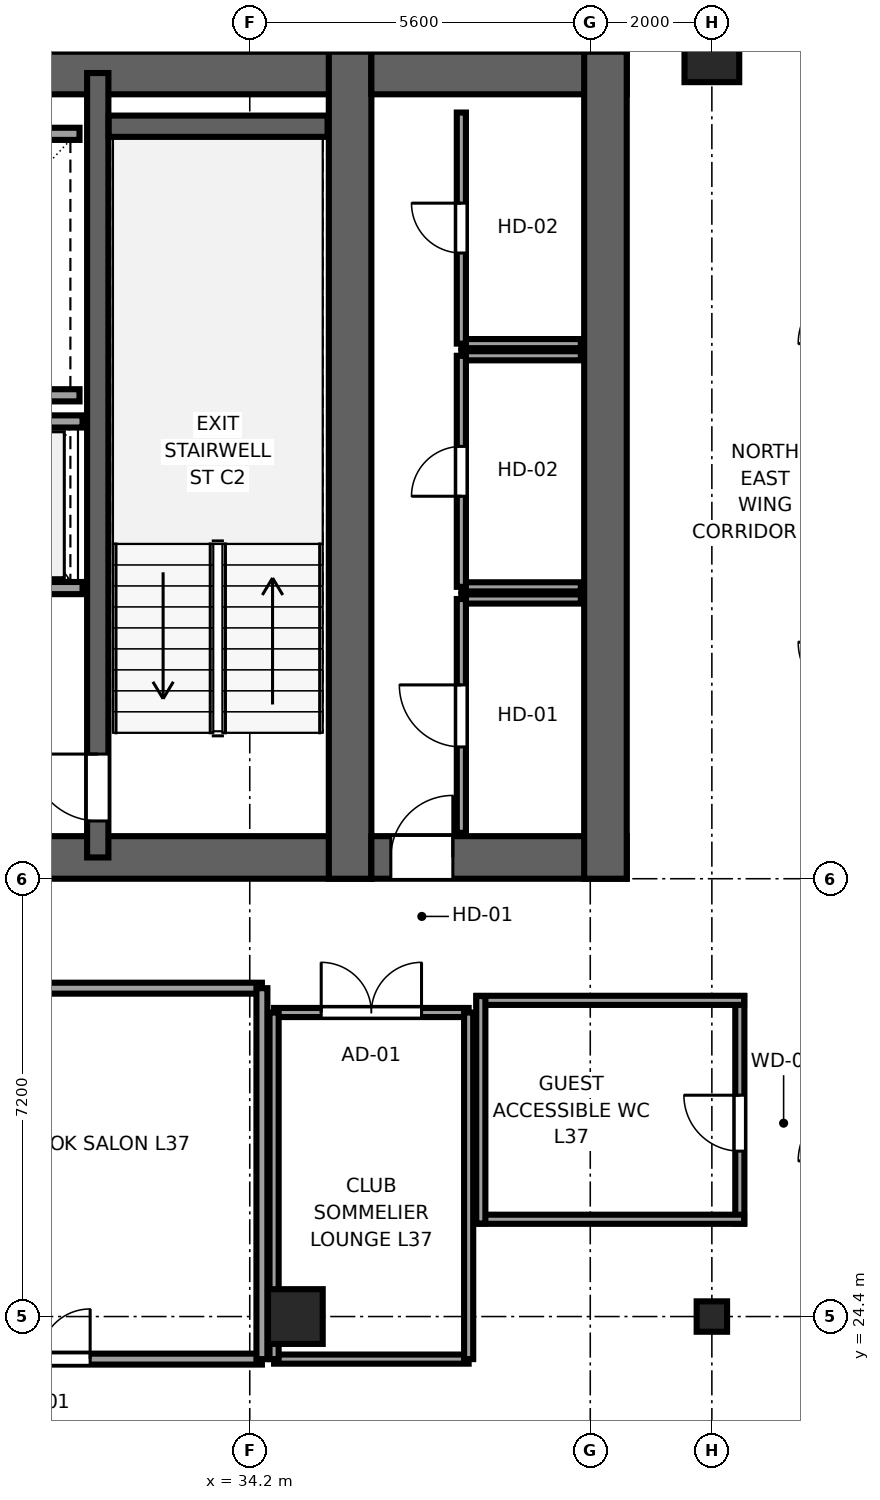
"""IFC4 building model, lengths in metres.
Left out: names, types, materials, properties, quantities, classifications, styles, units other than length and angle.
Written with IfcOpenShell. Run it as: python <this file> out.ifc"""

import sys

from ifc_helpers import new_model, si_unit, direction, frame, frame_2d, origin, origin_2d, place, context, subcontext, project, spatial, rectangle, i_section, extrude, source, transform, mapped, element, fill, save


model = new_model("IFC4")
c1 = context("Model", 3, precision=1e-05, world=origin(), true_north=direction((0.0, 1.0)))
c2 = subcontext(c1, "Body", "Model", "MODEL_VIEW")
j1 = project(units=[si_unit("LENGTHUNIT", "METRE"), si_unit("PLANEANGLEUNIT", "RADIAN")], contexts=[c1])
p1 = place(None, origin())
s1 = spatial("IfcSite", under=j1, at=p1, CompositionType="ELEMENT")
p2 = place(p1, origin())
s2 = spatial("IfcBuilding", under=s1, at=p2, CompositionType="ELEMENT")
p3 = place(p2, frame((0.0, 0.0, 143.5)))
s3 = spatial("IfcBuildingStorey", under=s2, at=p3, CompositionType="ELEMENT", Elevation=143.5)
p4 = place(p3, frame((9.8, 31.95, 0.0), z_axis=(0.0, 0.0, 1.0), x_axis=(1.0, 0.0, 0.0)))
e1 = element("IfcWall", 1, at=p4, inside=s3, PredefinedType="SHEAR", context=c2, shape_type="SweptSolid", body=[
    extrude(rectangle(XDim=26.4, YDim=0.7, at=frame_2d((13.2, 0.0))), origin(), (0.0, 0.0, 1.0), 3.55),
])
p5 = place(p4, frame((6.32, 0.0, 0.0), z_axis=(0.0, 0.0, 1.0), x_axis=(-1.0, 0.0, 0.0)))
e2 = element("IfcOpeningElement", 2, at=p5, cuts=e1, PredefinedType="OPENING", context=c2, shape_type="SweptSolid", body=[
    extrude(rectangle(XDim=1.5, YDim=2.04, at=frame_2d((0.75, 1.02))), frame((0.0, 0.36, 0.0), z_axis=(0.0, -1.0, 0.0), x_axis=(1.0, 0.0, 0.0)), (0.0, 0.0, 1.0), 0.72),
])
p6 = place(p4, frame((13.95, 0.0, 0.0), z_axis=(0.0, 0.0, 1.0), x_axis=(-1.0, 0.0, 0.0)))
e3 = element("IfcOpeningElement", 3, at=p6, cuts=e1, PredefinedType="OPENING", context=c2, shape_type="SweptSolid", body=[
    extrude(rectangle(XDim=1.5, YDim=2.04, at=frame_2d((0.75, 1.02))), frame((0.0, 0.36, 0.0), z_axis=(0.0, -1.0, 0.0), x_axis=(1.0, 0.0, 0.0)), (0.0, 0.0, 1.0), 0.72),
])
p7 = place(p4, frame((20.25, 0.0, 0.0), z_axis=(0.0, 0.0, 1.0), x_axis=(-1.0, 0.0, 0.0)))
e4 = element("IfcOpeningElement", 4, at=p7, cuts=e1, PredefinedType="OPENING", context=c2, shape_type="SweptSolid", body=[
    extrude(rectangle(XDim=1.5, YDim=2.04, at=frame_2d((0.75, 1.02))), frame((0.0, 0.36, 0.0), z_axis=(0.0, -1.0, 0.0), x_axis=(1.0, 0.0, 0.0)), (0.0, 0.0, 1.0), 0.72),
])
p8 = place(p4, frame((8.37, 0.0, 0.0), z_axis=(0.0, 0.0, 1.0), x_axis=(-1.0, 0.0, 0.0)))
e5 = element("IfcOpeningElement", 5, at=p8, cuts=e1, PredefinedType="OPENING", context=c2, shape_type="SweptSolid", body=[
    extrude(rectangle(XDim=0.82, YDim=2.01, at=frame_2d((0.41, 1.005))), frame((0.0, 0.36, 0.0), z_axis=(0.0, -1.0, 0.0), x_axis=(1.0, 0.0, 0.0)), (0.0, 0.0, 1.0), 0.72),
])
p9 = place(p3, frame((9.8, 44.85, 0.0), z_axis=(0.0, 0.0, 1.0), x_axis=(1.0, 0.0, 0.0)))
e6 = element("IfcWall", 6, at=p9, inside=s3, PredefinedType="SHEAR", context=c2, shape_type="SweptSolid", body=[
    extrude(rectangle(XDim=26.4, YDim=0.7, at=frame_2d((13.2, 0.0))), origin(), (0.0, 0.0, 1.0), 3.55),
])
p10 = place(p3, frame((35.85, 31.6, 0.0), z_axis=(0.0, 0.0, 1.0), x_axis=(0.0, 1.0, 0.0)))
e7 = element("IfcWall", 7, at=p10, inside=s3, PredefinedType="SHEAR", context=c2, shape_type="SweptSolid", body=[
    extrude(rectangle(XDim=13.6, YDim=0.7, at=frame_2d((6.8, 0.0))), origin(), (0.0, 0.0, 1.0), 3.55),
])
p11 = place(p3, frame((31.7, 31.95, 0.0), z_axis=(0.0, 0.0, 1.0), x_axis=(0.0, 1.0, 0.0)))
e8 = element("IfcWall", 8, at=p11, inside=s3, PredefinedType="SHEAR", context=c2, shape_type="SweptSolid", body=[
    extrude(rectangle(XDim=12.9, YDim=0.35, at=frame_2d((6.45, 0.0))), origin(), (0.0, 0.0, 1.0), 3.55),
])
p12 = place(p11, frame((1.7, 0.0, 0.0), z_axis=(0.0, 0.0, 1.0), x_axis=(-1.0, 0.0, 0.0)))
e9 = element("IfcOpeningElement", 9, at=p12, cuts=e8, PredefinedType="OPENING", context=c2, shape_type="SweptSolid", body=[
    extrude(rectangle(XDim=1.1, YDim=2.12, at=frame_2d((0.55, 1.06))), frame((0.0, 0.185, 0.0), z_axis=(0.0, -1.0, 0.0), x_axis=(1.0, 0.0, 0.0)), (0.0, 0.0, 1.0), 0.37),
])
p13 = place(p3, frame((36.2, 31.95, 0.0), z_axis=(0.0, 0.0, 1.0), x_axis=(1.0, 0.0, 0.0)))
e10 = element("IfcWall", 10, at=p13, inside=s3, PredefinedType="SHEAR", context=c2, shape_type="SweptSolid", body=[
    extrude(rectangle(XDim=4.2, YDim=0.7, at=frame_2d((2.1, 0.0))), origin(), (0.0, 0.0, 1.0), 3.55),
])
p14 = place(p13, frame((1.34, 0.0, 0.0), z_axis=(0.0, 0.0, 1.0), x_axis=(-1.0, 0.0, 0.0)))
e11 = element("IfcOpeningElement", 11, at=p14, cuts=e10, PredefinedType="OPENING", context=c2, shape_type="SweptSolid", body=[
    extrude(rectangle(XDim=1.02, YDim=2.03, at=frame_2d((0.51, 1.015))), frame((0.0, 0.36, 0.0), z_axis=(0.0, -1.0, 0.0), x_axis=(1.0, 0.0, 0.0)), (0.0, 0.0, 1.0), 0.72),
])
p15 = place(p3, frame((36.2, 44.85, 0.0), z_axis=(0.0, 0.0, 1.0), x_axis=(1.0, 0.0, 0.0)))
e12 = element("IfcWall", 12, at=p15, inside=s3, PredefinedType="SHEAR", context=c2, shape_type="SweptSolid", body=[
    extrude(rectangle(XDim=4.2, YDim=0.7, at=frame_2d((2.1, 0.0))), origin(), (0.0, 0.0, 1.0), 3.55),
])
p16 = place(p3, frame((40.05, 31.6, 0.0), z_axis=(0.0, 0.0, 1.0), x_axis=(0.0, 1.0, 0.0)))
e13 = element("IfcWall", 13, at=p16, inside=s3, PredefinedType="SHEAR", context=c2, shape_type="SweptSolid", body=[
    extrude(rectangle(XDim=13.6, YDim=0.7, at=frame_2d((6.8, 0.0))), origin(), (0.0, 0.0, 1.0), 3.55),
])
p17 = place(p3, frame((31.88, 43.975, 0.0), z_axis=(0.0, 0.0, 1.0), x_axis=(1.0, 0.0, 0.0)))
e14 = element("IfcWall", 14, at=p17, inside=s3, PredefinedType="SHEAR", context=c2, shape_type="SweptSolid", body=[
    extrude(rectangle(XDim=3.6, YDim=0.35, at=frame_2d((1.8, 0.0))), origin(), (0.0, 0.0, 1.0), 3.55),
])
m1 = source(origin(), c2, "Body", "SweptSolid", [
    extrude(rectangle(XDim=0.9, YDim=0.9, at=origin_2d()), origin(), (0.0, 0.0, 1.0), 3.55),
])
p18 = place(p3, frame((34.95, 24.4, 0.0), z_axis=(0.0, 0.0, 1.0), x_axis=(1.0, 0.0, 0.0)))
e15 = element("IfcColumn", 15, at=p18, inside=s3, PredefinedType="COLUMN", context=c2, shape_type="MappedRepresentation", body=[
    mapped(m1, transform((0.0, 0.0, 0.0), x_axis=(1.0, 0.0, 0.0), y_axis=(0.0, 1.0, 0.0), z_axis=(0.0, 0.0, 1.0), scale=1.0)),
])
m2 = source(origin(), c2, "Body", "SweptSolid", [
    extrude(i_section(OverallWidth=0.5, OverallDepth=0.5, WebThickness=0.022, FlangeThickness=0.034, at=origin_2d()), origin(), (0.0, 0.0, 1.0), 3.55),
])
p19 = place(p3, frame((41.8, 24.4, 0.0), z_axis=(0.0, 0.0, 1.0), x_axis=(1.0, 0.0, 0.0)))
e16 = element("IfcColumn", 16, at=p19, inside=s3, PredefinedType="COLUMN", context=c2, shape_type="MappedRepresentation", body=[
    mapped(m2, transform((0.0, 0.0, 0.0), x_axis=(1.0, 0.0, 0.0), y_axis=(0.0, 1.0, 0.0), z_axis=(0.0, 0.0, 1.0), scale=1.0)),
])
p20 = place(p3, frame((41.8, 45.15, 0.0), z_axis=(0.0, 0.0, 1.0), x_axis=(1.0, 0.0, 0.0)))
e17 = element("IfcColumn", 17, at=p20, inside=s3, PredefinedType="COLUMN", context=c2, shape_type="MappedRepresentation", body=[
    mapped(m1, transform((0.0, 0.0, 0.0), x_axis=(1.0, 0.0, 0.0), y_axis=(0.0, 1.0, 0.0), z_axis=(0.0, 0.0, 1.0), scale=1.0)),
])
for number, where, z_axis, x_axis in (
    (18, (27.3, 39.55, 0.0), (0.0, 0.0, 1.0), (1.0, 0.0, 0.0)),
    (19, (27.3, 43.85, 0.0), (0.0, 0.0, 1.0), (1.0, 0.0, 0.0)),
):
    element("IfcWall", number, at=place(p3, frame(where, z_axis=z_axis, x_axis=x_axis)), inside=s3, PredefinedType="SOLIDWALL", context=c2, shape_type="SweptSolid", body=[
        extrude(rectangle(XDim=4.1, YDim=0.2, at=frame_2d((2.05, 0.0))), origin(), (0.0, 0.0, 1.0), 3.29),
    ])
p21 = place(p3, frame((27.375, 36.38, 0.0), z_axis=(0.0, 0.0, 1.0), x_axis=(1.0, 0.0, 0.0)))
e20 = element("IfcWall", 20, at=p21, inside=s3, PredefinedType="SOLIDWALL", context=c2, shape_type="SweptSolid", body=[
    extrude(rectangle(XDim=4.075, YDim=0.2, at=frame_2d((2.038, 0.0))), origin(), (0.0, 0.0, 1.0), 3.29),
])
p22 = place(p21, frame((0.525, 0.0, 0.0)))
e21 = element("IfcOpeningElement", 21, at=p22, cuts=e20, PredefinedType="OPENING", context=c2, shape_type="SweptSolid", body=[
    extrude(rectangle(XDim=1.1, YDim=2.12, at=frame_2d((0.55, 1.06))), frame((0.0, 0.11, 0.0), z_axis=(0.0, -1.0, 0.0), x_axis=(1.0, 0.0, 0.0)), (0.0, 0.0, 1.0), 0.22),
])
p23 = place(p21, frame((2.425, 0.0, 0.0)))
e22 = element("IfcOpeningElement", 22, at=p23, cuts=e20, PredefinedType="OPENING", context=c2, shape_type="SweptSolid", body=[
    extrude(rectangle(XDim=1.1, YDim=2.12, at=frame_2d((0.55, 1.06))), frame((0.0, 0.11, 0.0), z_axis=(0.0, -1.0, 0.0), x_axis=(1.0, 0.0, 0.0)), (0.0, 0.0, 1.0), 0.22),
])
p24 = place(p3, frame((27.375, 39.12, 0.0), z_axis=(0.0, 0.0, 1.0), x_axis=(1.0, 0.0, 0.0)))
e23 = element("IfcWall", 23, at=p24, inside=s3, PredefinedType="SOLIDWALL", context=c2, shape_type="SweptSolid", body=[
    extrude(rectangle(XDim=4.075, YDim=0.2, at=frame_2d((2.038, 0.0))), origin(), (0.0, 0.0, 1.0), 3.29),
])
p25 = place(p3, frame((37.68, 36.2, 0.0), z_axis=(0.0, 0.0, 1.0), x_axis=(1.0, 0.0, 0.0)))
e24 = element("IfcWall", 24, at=p25, inside=s3, PredefinedType="PARTITIONING", context=c2, shape_type="SweptSolid", body=[
    extrude(rectangle(XDim=1.965, YDim=0.15, at=frame_2d((0.982, 0.0))), origin(), (0.0, 0.0, 1.0), 3.29),
])
p26 = place(p3, frame((37.68, 32.355, 0.0), z_axis=(0.0, 0.0, 1.0), x_axis=(0.0, 1.0, 0.0)))
e25 = element("IfcWall", 25, at=p26, inside=s3, PredefinedType="PARTITIONING", context=c2, shape_type="SweptSolid", body=[
    extrude(rectangle(XDim=3.845, YDim=0.15, at=frame_2d((1.922, 0.0))), origin(), (0.0, 0.0, 1.0), 3.29),
])
p27 = place(p26, frame((1.413, 0.0, 0.0)))
e26 = element("IfcOpeningElement", 26, at=p27, cuts=e25, PredefinedType="OPENING", context=c2, shape_type="SweptSolid", body=[
    extrude(rectangle(XDim=1.02, YDim=2.03, at=frame_2d((0.51, 1.015))), frame((0.0, 0.085, 0.0), z_axis=(0.0, -1.0, 0.0), x_axis=(1.0, 0.0, 0.0)), (0.0, 0.0, 1.0), 0.17),
])
for number, where, z_axis, x_axis in (
    (27, (37.68, 36.4, 0.0), (0.0, 0.0, 1.0), (1.0, 0.0, 0.0)),
    (28, (37.68, 40.2, 0.0), (0.0, 0.0, 1.0), (1.0, 0.0, 0.0)),
):
    element("IfcWall", number, at=place(p3, frame(where, z_axis=z_axis, x_axis=x_axis)), inside=s3, PredefinedType="PARTITIONING", context=c2, shape_type="SweptSolid", body=[
        extrude(rectangle(XDim=1.965, YDim=0.15, at=frame_2d((0.982, 0.0))), origin(), (0.0, 0.0, 1.0), 3.29),
    ])
p28 = place(p3, frame((37.68, 36.4, 0.0), z_axis=(0.0, 0.0, 1.0), x_axis=(0.0, 1.0, 0.0)))
e29 = element("IfcWall", 29, at=p28, inside=s3, PredefinedType="PARTITIONING", context=c2, shape_type="SweptSolid", body=[
    extrude(rectangle(XDim=3.8, YDim=0.15, at=frame_2d((1.9, 0.0))), origin(), (0.0, 0.0, 1.0), 3.29),
])
p29 = place(p28, frame((1.49, 0.0, 0.0)))
e30 = element("IfcOpeningElement", 30, at=p29, cuts=e29, PredefinedType="OPENING", context=c2, shape_type="SweptSolid", body=[
    extrude(rectangle(XDim=0.82, YDim=2.01, at=frame_2d((0.41, 1.005))), frame((0.0, 0.085, 0.0), z_axis=(0.0, -1.0, 0.0), x_axis=(1.0, 0.0, 0.0)), (0.0, 0.0, 1.0), 0.17),
])
p30 = place(p3, frame((37.68, 40.4, 0.0), z_axis=(0.0, 0.0, 1.0), x_axis=(1.0, 0.0, 0.0)))
e31 = element("IfcWall", 31, at=p30, inside=s3, PredefinedType="PARTITIONING", context=c2, shape_type="SweptSolid", body=[
    extrude(rectangle(XDim=1.965, YDim=0.15, at=frame_2d((0.982, 0.0))), origin(), (0.0, 0.0, 1.0), 3.29),
])
p31 = place(p3, frame((37.68, 40.4, 0.0), z_axis=(0.0, 0.0, 1.0), x_axis=(0.0, 1.0, 0.0)))
e32 = element("IfcWall", 32, at=p31, inside=s3, PredefinedType="PARTITIONING", context=c2, shape_type="SweptSolid", body=[
    extrude(rectangle(XDim=3.8, YDim=0.15, at=frame_2d((1.9, 0.0))), origin(), (0.0, 0.0, 1.0), 3.29),
])
p32 = place(p31, frame((1.49, 0.0, 0.0)))
e33 = element("IfcOpeningElement", 33, at=p32, cuts=e32, PredefinedType="OPENING", context=c2, shape_type="SweptSolid", body=[
    extrude(rectangle(XDim=0.82, YDim=2.01, at=frame_2d((0.41, 1.005))), frame((0.0, 0.085, 0.0), z_axis=(0.0, -1.0, 0.0), x_axis=(1.0, 0.0, 0.0)), (0.0, 0.0, 1.0), 0.17),
])
p33 = place(p3, frame((42.26, 25.93, 0.0), z_axis=(0.0, 0.0, 1.0), x_axis=(0.0, 1.0, 0.0)))
e34 = element("IfcWall", 34, at=p33, inside=s3, PredefinedType="PARTITIONING", context=c2, shape_type="SweptSolid", body=[
    extrude(rectangle(XDim=3.74, YDim=0.15, at=frame_2d((1.87, 0.0))), origin(), (0.0, 0.0, 1.0), 3.29),
])
p34 = place(p33, frame((1.19, 0.0, 0.0)))
e35 = element("IfcOpeningElement", 35, at=p34, cuts=e34, PredefinedType="OPENING", context=c2, shape_type="SweptSolid", body=[
    extrude(rectangle(XDim=0.92, YDim=2.01, at=frame_2d((0.46, 1.005))), frame((0.0, 0.085, 0.0), z_axis=(0.0, -1.0, 0.0), x_axis=(1.0, 0.0, 0.0)), (0.0, 0.0, 1.0), 0.17),
])
for number, where, z_axis, x_axis in (
    (36, (37.93, 26.0, 0.0), (0.0, 0.0, 1.0), (1.0, 0.0, 0.0)),
    (37, (37.93, 29.6, 0.0), (0.0, 0.0, 1.0), (1.0, 0.0, 0.0)),
):
    element("IfcWall", number, at=place(p3, frame(where, z_axis=z_axis, x_axis=x_axis)), inside=s3, PredefinedType="PARTITIONING", context=c2, shape_type="SweptSolid", body=[
        extrude(rectangle(XDim=4.4, YDim=0.15, at=frame_2d((2.2, 0.0))), origin(), (0.0, 0.0, 1.0), 3.29),
    ])
p35 = place(p3, frame((38.0, 25.93, 0.0), z_axis=(0.0, 0.0, 1.0), x_axis=(0.0, 1.0, 0.0)))
e38 = element("IfcWall", 38, at=p35, inside=s3, PredefinedType="PARTITIONING", context=c2, shape_type="SweptSolid", body=[
    extrude(rectangle(XDim=3.74, YDim=0.15, at=frame_2d((1.87, 0.0))), origin(), (0.0, 0.0, 1.0), 3.29),
])
p36 = place(p3, frame((27.1, 23.7, 0.0), z_axis=(0.0, 0.0, 1.0), x_axis=(1.0, 0.0, 0.0)))
e39 = element("IfcWall", 39, at=p36, inside=s3, PredefinedType="PARTITIONING", context=c2, shape_type="SweptSolid", body=[
    extrude(rectangle(XDim=7.3, YDim=0.18, at=frame_2d((3.65, 0.0))), origin(), (0.0, 0.0, 1.0), 3.29),
])
p37 = place(p36, frame((2.825, 0.0, 0.0)))
e40 = element("IfcOpeningElement", 40, at=p37, cuts=e39, PredefinedType="OPENING", context=c2, shape_type="SweptSolid", body=[
    extrude(rectangle(XDim=1.65, YDim=2.15, at=frame_2d((0.825, 1.075))), frame((0.0, 0.1, 0.0), z_axis=(0.0, -1.0, 0.0), x_axis=(1.0, 0.0, 0.0)), (0.0, 0.0, 1.0), 0.2),
])
p38 = place(p3, frame((27.1, 29.8, 0.0), z_axis=(0.0, 0.0, 1.0), x_axis=(1.0, 0.0, 0.0)))
e41 = element("IfcWall", 41, at=p38, inside=s3, PredefinedType="PARTITIONING", context=c2, shape_type="SweptSolid", body=[
    extrude(rectangle(XDim=7.3, YDim=0.18, at=frame_2d((3.65, 0.0))), origin(), (0.0, 0.0, 1.0), 3.29),
])
p39 = place(p3, frame((34.4, 23.7, 0.0), z_axis=(0.0, 0.0, 1.0), x_axis=(0.0, 1.0, 0.0)))
e42 = element("IfcWall", 42, at=p39, inside=s3, PredefinedType="PARTITIONING", context=c2, shape_type="SweptSolid", body=[
    extrude(rectangle(XDim=6.1, YDim=0.18, at=frame_2d((3.05, 0.0))), origin(), (0.0, 0.0, 1.0), 3.29),
])
p40 = place(p3, frame((34.6, 23.7, 0.0), z_axis=(0.0, 0.0, 1.0), x_axis=(1.0, 0.0, 0.0)))
e43 = element("IfcWall", 43, at=p40, inside=s3, PredefinedType="PARTITIONING", context=c2, shape_type="SweptSolid", body=[
    extrude(rectangle(XDim=3.2, YDim=0.15, at=frame_2d((1.6, 0.0))), origin(), (0.0, 0.0, 1.0), 3.29),
])
p41 = place(p3, frame((34.6, 29.4, 0.0), z_axis=(0.0, 0.0, 1.0), x_axis=(1.0, 0.0, 0.0)))
e44 = element("IfcWall", 44, at=p41, inside=s3, PredefinedType="PARTITIONING", context=c2, shape_type="SweptSolid", body=[
    extrude(rectangle(XDim=3.2, YDim=0.15, at=frame_2d((1.6, 0.0))), origin(), (0.0, 0.0, 1.0), 3.29),
])
p42 = place(p41, frame((0.775, 0.0, 0.0)))
e45 = element("IfcOpeningElement", 45, at=p42, cuts=e44, PredefinedType="OPENING", context=c2, shape_type="SweptSolid", body=[
    extrude(rectangle(XDim=1.65, YDim=2.15, at=frame_2d((0.825, 1.075))), frame((0.0, 0.085, 0.0), z_axis=(0.0, -1.0, 0.0), x_axis=(1.0, 0.0, 0.0)), (0.0, 0.0, 1.0), 0.17),
])
for number, where, z_axis, x_axis in (
    (46, (34.6, 23.7, 0.0), (0.0, 0.0, 1.0), (0.0, 1.0, 0.0)),
    (47, (37.8, 23.7, 0.0), (0.0, 0.0, 1.0), (0.0, 1.0, 0.0)),
):
    element("IfcWall", number, at=place(p3, frame(where, z_axis=z_axis, x_axis=x_axis)), inside=s3, PredefinedType="PARTITIONING", context=c2, shape_type="SweptSolid", body=[
        extrude(rectangle(XDim=5.7, YDim=0.15, at=frame_2d((2.85, 0.0))), origin(), (0.0, 0.0, 1.0), 3.29),
    ])
m3 = source(origin(), c2, "Body", "SweptSolid", [
    extrude(rectangle(XDim=1.1, YDim=2.12, at=frame_2d((0.55, 1.06))), frame((0.0, 0.025, 0.0), z_axis=(0.0, -1.0, 0.0), x_axis=(1.0, 0.0, 0.0)), (0.0, 0.0, 1.0), 0.05),
])
p43 = place(p12, origin())
e48 = element("IfcDoor", 48, at=p43, inside=s3, OperationType="SINGLE_SWING_RIGHT", PredefinedType="DOOR", context=c2, shape_type="MappedRepresentation", body=[
    mapped(m3, transform((0.0, 0.0, 0.0), x_axis=(1.0, 0.0, 0.0), y_axis=(0.0, 1.0, 0.0), z_axis=(0.0, 0.0, 1.0), scale=1.0)),
])
fill(e9, e48)
m4 = source(origin(), c2, "Body", "SweptSolid", [
    extrude(rectangle(XDim=1.02, YDim=2.03, at=frame_2d((0.51, 1.015))), frame((0.0, 0.025, 0.0), z_axis=(0.0, -1.0, 0.0), x_axis=(1.0, 0.0, 0.0)), (0.0, 0.0, 1.0), 0.05),
])
p44 = place(p14, origin())
e49 = element("IfcDoor", 49, at=p44, inside=s3, OperationType="SINGLE_SWING_RIGHT", PredefinedType="DOOR", context=c2, shape_type="MappedRepresentation", body=[
    mapped(m4, transform((0.0, 0.0, 0.0), x_axis=(1.0, 0.0, 0.0), y_axis=(0.0, 1.0, 0.0), z_axis=(0.0, 0.0, 1.0), scale=1.0)),
])
fill(e11, e49)
p45 = place(p27, origin())
e50 = element("IfcDoor", 50, at=p45, inside=s3, OperationType="SINGLE_SWING_RIGHT", PredefinedType="DOOR", context=c2, shape_type="MappedRepresentation", body=[
    mapped(m4, transform((0.0, 0.0, 0.0), x_axis=(1.0, 0.0, 0.0), y_axis=(0.0, 1.0, 0.0), z_axis=(0.0, 0.0, 1.0), scale=1.0)),
])
fill(e26, e50)
m5 = source(origin(), c2, "Body", "SweptSolid", [
    extrude(rectangle(XDim=0.82, YDim=2.01, at=frame_2d((0.41, 1.005))), frame((0.0, 0.025, 0.0), z_axis=(0.0, -1.0, 0.0), x_axis=(1.0, 0.0, 0.0)), (0.0, 0.0, 1.0), 0.05),
])
p46 = place(p29, origin())
e51 = element("IfcDoor", 51, at=p46, inside=s3, OperationType="SINGLE_SWING_LEFT", PredefinedType="DOOR", context=c2, shape_type="MappedRepresentation", body=[
    mapped(m5, transform((0.0, 0.0, 0.0), x_axis=(1.0, 0.0, 0.0), y_axis=(0.0, 1.0, 0.0), z_axis=(0.0, 0.0, 1.0), scale=1.0)),
])
fill(e30, e51)
p47 = place(p32, origin())
e52 = element("IfcDoor", 52, at=p47, inside=s3, OperationType="SINGLE_SWING_RIGHT", PredefinedType="DOOR", context=c2, shape_type="MappedRepresentation", body=[
    mapped(m5, transform((0.0, 0.0, 0.0), x_axis=(1.0, 0.0, 0.0), y_axis=(0.0, 1.0, 0.0), z_axis=(0.0, 0.0, 1.0), scale=1.0)),
])
fill(e33, e52)
m6 = source(origin(), c2, "Body", "SweptSolid", [
    extrude(rectangle(XDim=0.92, YDim=2.01, at=frame_2d((0.46, 1.005))), frame((0.0, 0.025, 0.0), z_axis=(0.0, -1.0, 0.0), x_axis=(1.0, 0.0, 0.0)), (0.0, 0.0, 1.0), 0.05),
])
p48 = place(p34, origin())
e53 = element("IfcDoor", 53, at=p48, inside=s3, OperationType="SINGLE_SWING_RIGHT", PredefinedType="DOOR", context=c2, shape_type="MappedRepresentation", body=[
    mapped(m6, transform((0.0, 0.0, 0.0), x_axis=(1.0, 0.0, 0.0), y_axis=(0.0, 1.0, 0.0), z_axis=(0.0, 0.0, 1.0), scale=1.0)),
])
fill(e35, e53)
m7 = source(origin(), c2, "Body", "SweptSolid", [
    extrude(rectangle(XDim=1.65, YDim=2.15, at=frame_2d((0.825, 1.075))), frame((0.0, 0.025, 0.0), z_axis=(0.0, -1.0, 0.0), x_axis=(1.0, 0.0, 0.0)), (0.0, 0.0, 1.0), 0.05),
])
p49 = place(p37, origin())
e54 = element("IfcDoor", 54, at=p49, inside=s3, OperationType="DOUBLE_DOOR_SINGLE_SWING", PredefinedType="DOOR", context=c2, shape_type="MappedRepresentation", body=[
    mapped(m7, transform((0.0, 0.0, 0.0), x_axis=(1.0, 0.0, 0.0), y_axis=(0.0, 1.0, 0.0), z_axis=(0.0, 0.0, 1.0), scale=1.0)),
])
fill(e40, e54)
p50 = place(p42, origin())
e55 = element("IfcDoor", 55, at=p50, inside=s3, OperationType="DOUBLE_DOOR_SINGLE_SWING", PredefinedType="DOOR", context=c2, shape_type="MappedRepresentation", body=[
    mapped(m7, transform((0.0, 0.0, 0.0), x_axis=(1.0, 0.0, 0.0), y_axis=(0.0, 1.0, 0.0), z_axis=(0.0, 0.0, 1.0), scale=1.0)),
])
fill(e45, e55)
save(model, sys.argv[1])
